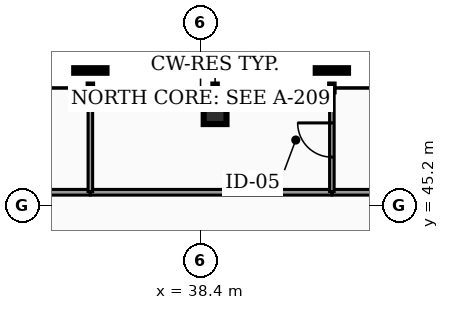
"""IFC4 building model, lengths in metres.
Left out: names, types, materials, properties, quantities, classifications, styles, units other than length and angle.
Written with IfcOpenShell. Run it as: python <this file> out.ifc"""

import sys

from ifc_helpers import new_model, si_unit, direction, frame, frame_2d, origin, origin_2d, place, context, subcontext, project, spatial, rectangle, hollow_rectangle, extrude, element, fill, save


model = new_model("IFC4")
c1 = context("Model", 3, precision=1e-05, world=origin(), true_north=direction((0.0, 1.0)))
c2 = subcontext(c1, "Body", "Model", "MODEL_VIEW")
j1 = project(units=[si_unit("LENGTHUNIT", "METRE"), si_unit("PLANEANGLEUNIT", "RADIAN")], contexts=[c1])
p1 = place(None, origin())
s1 = spatial("IfcSite", under=j1, at=p1, CompositionType="ELEMENT")
p2 = place(p1, origin())
s2 = spatial("IfcBuilding", under=s1, at=p2, CompositionType="ELEMENT")
p3 = place(p2, frame((0.0, 0.0, 218.96)))
s3 = spatial("IfcBuildingStorey", under=s2, at=p3, CompositionType="ELEMENT", Elevation=218.96)
p4 = place(p3, frame((38.782, 47.644, 0.0), z_axis=(0.0, 0.0, 1.0), x_axis=(1.0, 0.0, 0.0)))
e1 = element("IfcColumn", 1, at=p4, inside=s3, PredefinedType="COLUMN", context=c2, shape_type="SweptSolid", body=[
    extrude(hollow_rectangle(XDim=0.6, YDim=0.6, WallThickness=0.03, at=origin_2d()), origin(), (0.0, 0.0, 1.0), 3.18),
])
p5 = place(p3, frame((28.55, 45.55, 0.0), z_axis=(0.0, 0.0, 1.0), x_axis=(1.0, 0.0, 0.0)))
e2 = element("IfcWall", 2, at=p5, inside=s3, PredefinedType="PARTITIONING", context=c2, shape_type="SweptSolid", body=[
    extrude(rectangle(XDim=6.945, YDim=0.15, at=frame_2d((3.473, 0.0))), origin(), (0.0, 0.0, 1.0), 2.235),
])
p6 = place(p3, frame((41.86, 45.55, 0.0), z_axis=(0.0, 0.0, 1.0), x_axis=(1.0, 0.0, 0.0)))
e3 = element("IfcWall", 3, at=p6, inside=s3, PredefinedType="PARTITIONING", context=c2, shape_type="SweptSolid", body=[
    extrude(rectangle(XDim=6.49, YDim=0.15, at=frame_2d((3.245, 0.0))), origin(), (0.0, 0.0, 1.0), 2.235),
])
p7 = place(p3, frame((35.505, 45.55, 0.0), z_axis=(0.0, 0.0, 1.0), x_axis=(1.0, 0.0, 0.0)))
e4 = element("IfcWall", 4, at=p7, inside=s3, PredefinedType="PARTITIONING", context=c2, shape_type="SweptSolid", body=[
    extrude(rectangle(XDim=6.345, YDim=0.15, at=frame_2d((3.173, 0.0))), origin(), (0.0, 0.0, 1.0), 2.235),
])
p8 = place(p3, frame((35.5, 45.57, 0.0), z_axis=(0.0, 0.0, 1.0), x_axis=(0.0, 1.0, 0.0)))
e5 = element("IfcWall", 5, at=p8, inside=s3, PredefinedType="PARTITIONING", context=c2, shape_type="SweptSolid", body=[
    extrude(rectangle(XDim=2.709, YDim=0.12, at=frame_2d((1.354, 0.0))), origin(), (0.0, 0.0, 1.0), 2.235),
])
p9 = place(p3, frame((41.855, 45.57, 0.0), z_axis=(0.0, 0.0, 1.0), x_axis=(0.0, 1.0, 0.0)))
e6 = element("IfcWall", 6, at=p9, inside=s3, PredefinedType="PARTITIONING", context=c2, shape_type="SweptSolid", body=[
    extrude(rectangle(XDim=2.709, YDim=0.12, at=frame_2d((1.354, 0.0))), origin(), (0.0, 0.0, 1.0), 2.235),
])
p10 = place(p9, frame((0.905, 0.0, 0.0)))
e7 = element("IfcOpeningElement", 7, at=p10, cuts=e6, PredefinedType="OPENING", context=c2, shape_type="SweptSolid", body=[
    extrude(rectangle(XDim=0.9, YDim=2.05, at=frame_2d((0.45, 1.025))), frame((0.0, 0.07, 0.0), z_axis=(0.0, -1.0, 0.0), x_axis=(1.0, 0.0, 0.0)), (0.0, 0.0, 1.0), 0.14),
])
p11 = place(p10, origin())
e8 = element("IfcDoor", 8, at=p11, inside=s3, OperationType="SINGLE_SWING_RIGHT", PredefinedType="DOOR", context=c2, shape_type="SweptSolid", body=[
    extrude(rectangle(XDim=0.9, YDim=2.05, at=frame_2d((0.45, 1.025))), frame((0.0, 0.025, 0.0), z_axis=(0.0, -1.0, 0.0), x_axis=(1.0, 0.0, 0.0)), (0.0, 0.0, 1.0), 0.05),
])
fill(e7, e8)
save(model, sys.argv[1])
